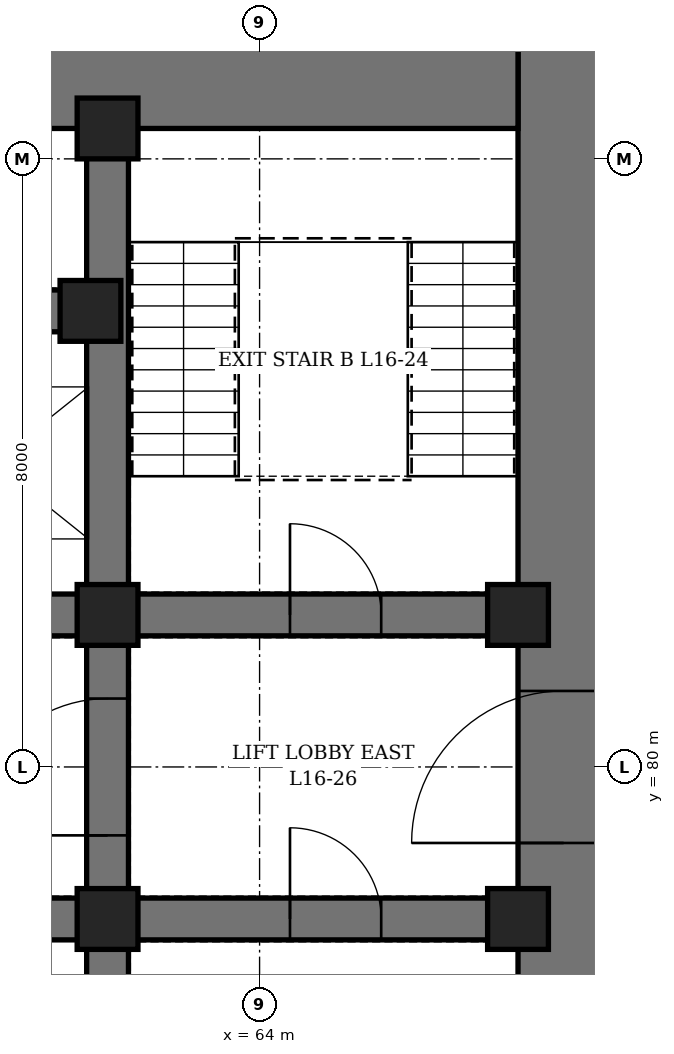
"""IFC4 building model, lengths in metres.
Left out: names, types, materials, properties, quantities, classifications, styles, units other than length and angle.
Written with IfcOpenShell. Run it as: python <this file> out.ifc"""

import sys

from ifc_helpers import new_model, si_unit, direction, frame, frame_2d, origin, origin_2d, place, context, subcontext, project, spatial, rectangle, hollow_rectangle, extrude, element, fill, save


model = new_model("IFC4")
c1 = context("Model", 3, precision=1e-05, world=origin(), true_north=direction((0.0, 1.0)))
c2 = subcontext(c1, "Body", "Model", "MODEL_VIEW")
j1 = project(units=[si_unit("LENGTHUNIT", "METRE"), si_unit("PLANEANGLEUNIT", "RADIAN")], contexts=[c1])
p1 = place(None, origin())
s1 = spatial("IfcSite", under=j1, at=p1, CompositionType="ELEMENT")
p2 = place(p1, origin())
s2 = spatial("IfcBuilding", under=s1, at=p2, CompositionType="ELEMENT")
p3 = place(p2, frame((0.0, 0.0, 76.9)))
s3 = spatial("IfcBuildingStorey", under=s2, at=p3, CompositionType="ELEMENT", Elevation=76.9)
p4 = place(p3, frame((68.0, 70.4, 0.0), z_axis=(0.0, 0.0, 1.0), x_axis=(0.0, 1.0, 0.0)))
e1 = element("IfcWall", 1, at=p4, inside=s3, PredefinedType="SHEAR", context=c2, shape_type="SweptSolid", body=[
    extrude(rectangle(XDim=19.2, YDim=1.2, at=frame_2d((9.6, 0.0))), origin(), (0.0, 0.0, 1.0), 4.2),
])
p5 = place(p4, frame((8.6, 0.0, 0.0)))
e2 = element("IfcOpeningElement", 2, at=p5, cuts=e1, PredefinedType="OPENING", context=c2, shape_type="SweptSolid", body=[
    extrude(rectangle(XDim=2.0, YDim=2.4, at=frame_2d((1.0, 1.2))), frame((0.0, 0.61, 0.0), z_axis=(0.0, -1.0, 0.0), x_axis=(1.0, 0.0, 0.0)), (0.0, 0.0, 1.0), 1.22),
])
p6 = place(p3, frame((44.6, 89.0, 0.0), z_axis=(0.0, 0.0, 1.0), x_axis=(1.0, 0.0, 0.0)))
e3 = element("IfcWall", 3, at=p6, inside=s3, PredefinedType="SHEAR", context=c2, shape_type="SweptSolid", body=[
    extrude(rectangle(XDim=22.8, YDim=1.2, at=frame_2d((11.4, 0.0))), origin(), (0.0, 0.0, 1.0), 4.2),
])
p7 = place(p6, frame((9.425, 0.0, 0.0)))
e4 = element("IfcOpeningElement", 4, at=p7, cuts=e3, PredefinedType="OPENING", context=c2, shape_type="SweptSolid", body=[
    extrude(rectangle(XDim=1.0, YDim=2.1, at=frame_2d((0.5, 1.05))), frame((0.0, 0.61, 0.0), z_axis=(0.0, -1.0, 0.0), x_axis=(1.0, 0.0, 0.0)), (0.0, 0.0, 1.0), 1.22),
])
p8 = place(p6, frame((6.65, 0.0, 0.0)))
e5 = element("IfcOpeningElement", 5, at=p8, cuts=e3, PredefinedType="OPENING", context=c2, shape_type="SweptSolid", body=[
    extrude(rectangle(XDim=0.9, YDim=2.1, at=frame_2d((0.45, 1.05))), frame((0.0, 0.61, 0.0), z_axis=(0.0, -1.0, 0.0), x_axis=(1.0, 0.0, 0.0)), (0.0, 0.0, 1.0), 1.22),
])
p9 = place(p6, frame((13.038, 0.0, 0.0)))
e6 = element("IfcOpeningElement", 6, at=p9, cuts=e3, PredefinedType="OPENING", context=c2, shape_type="SweptSolid", body=[
    extrude(rectangle(XDim=0.9, YDim=2.1, at=frame_2d((0.45, 1.05))), frame((0.0, 0.61, 0.0), z_axis=(0.0, -1.0, 0.0), x_axis=(1.0, 0.0, 0.0)), (0.0, 0.0, 1.0), 1.22),
])
p10 = place(p3, frame((62.0, 71.6, 0.0), z_axis=(0.0, 0.0, 1.0), x_axis=(0.0, 1.0, 0.0)))
e7 = element("IfcWall", 7, at=p10, inside=s3, PredefinedType="SHEAR", context=c2, shape_type="SweptSolid", body=[
    extrude(rectangle(XDim=16.8, YDim=0.55, at=frame_2d((8.4, 0.0))), origin(), (0.0, 0.0, 1.0), 4.2),
])
p11 = place(p10, frame((7.5, 0.0, 0.0)))
e8 = element("IfcOpeningElement", 8, at=p11, cuts=e7, PredefinedType="OPENING", context=c2, shape_type="SweptSolid", body=[
    extrude(rectangle(XDim=1.8, YDim=2.4, at=frame_2d((0.9, 1.2))), frame((0.0, 0.285, 0.0), z_axis=(0.0, -1.0, 0.0), x_axis=(1.0, 0.0, 0.0)), (0.0, 0.0, 1.0), 0.57),
])
p12 = place(p3, frame((62.275, 78.0, 0.0), z_axis=(0.0, 0.0, 1.0), x_axis=(1.0, 0.0, 0.0)))
e9 = element("IfcWall", 9, at=p12, inside=s3, PredefinedType="SHEAR", context=c2, shape_type="SweptSolid", body=[
    extrude(rectangle(XDim=5.125, YDim=0.55, at=frame_2d((2.562, 0.0))), origin(), (0.0, 0.0, 1.0), 4.2),
])
p13 = place(p12, frame((2.125, 0.0, 0.0)))
e10 = element("IfcOpeningElement", 10, at=p13, cuts=e9, PredefinedType="OPENING", context=c2, shape_type="SweptSolid", body=[
    extrude(rectangle(XDim=1.2, YDim=2.1, at=frame_2d((0.6, 1.05))), frame((0.0, 0.285, 0.0), z_axis=(0.0, -1.0, 0.0), x_axis=(1.0, 0.0, 0.0)), (0.0, 0.0, 1.0), 0.57),
])
p14 = place(p3, frame((62.275, 82.0, 0.0), z_axis=(0.0, 0.0, 1.0), x_axis=(1.0, 0.0, 0.0)))
e11 = element("IfcWall", 11, at=p14, inside=s3, PredefinedType="SHEAR", context=c2, shape_type="SweptSolid", body=[
    extrude(rectangle(XDim=5.125, YDim=0.55, at=frame_2d((2.562, 0.0))), origin(), (0.0, 0.0, 1.0), 4.2),
])
p15 = place(p14, frame((2.125, 0.0, 0.0)))
e12 = element("IfcOpeningElement", 12, at=p15, cuts=e11, PredefinedType="OPENING", context=c2, shape_type="SweptSolid", body=[
    extrude(rectangle(XDim=1.2, YDim=2.1, at=frame_2d((0.6, 1.05))), frame((0.0, 0.285, 0.0), z_axis=(0.0, -1.0, 0.0), x_axis=(1.0, 0.0, 0.0)), (0.0, 0.0, 1.0), 0.57),
])
p16 = place(p3, frame((50.275, 78.0, 0.0), z_axis=(0.0, 0.0, 1.0), x_axis=(1.0, 0.0, 0.0)))
e13 = element("IfcWall", 13, at=p16, inside=s3, PredefinedType="SHEAR", context=c2, shape_type="SweptSolid", body=[
    extrude(rectangle(XDim=11.45, YDim=0.55, at=frame_2d((5.725, 0.0))), origin(), (0.0, 0.0, 1.0), 4.2),
])
p17 = place(p16, frame((0.675, 0.0, 0.0)))
e14 = element("IfcOpeningElement", 14, at=p17, cuts=e13, PredefinedType="OPENING", context=c2, shape_type="SweptSolid", body=[
    extrude(rectangle(XDim=1.1, YDim=2.2, at=frame_2d((0.55, 1.1))), frame((0.0, 0.285, 0.0), z_axis=(0.0, -1.0, 0.0), x_axis=(1.0, 0.0, 0.0)), (0.0, 0.0, 1.0), 0.57),
])
p18 = place(p16, frame((3.675, 0.0, 0.0)))
e15 = element("IfcOpeningElement", 15, at=p18, cuts=e13, PredefinedType="OPENING", context=c2, shape_type="SweptSolid", body=[
    extrude(rectangle(XDim=1.1, YDim=2.2, at=frame_2d((0.55, 1.1))), frame((0.0, 0.285, 0.0), z_axis=(0.0, -1.0, 0.0), x_axis=(1.0, 0.0, 0.0)), (0.0, 0.0, 1.0), 0.57),
])
p19 = place(p16, frame((6.675, 0.0, 0.0)))
e16 = element("IfcOpeningElement", 16, at=p19, cuts=e13, PredefinedType="OPENING", context=c2, shape_type="SweptSolid", body=[
    extrude(rectangle(XDim=1.1, YDim=2.2, at=frame_2d((0.55, 1.1))), frame((0.0, 0.285, 0.0), z_axis=(0.0, -1.0, 0.0), x_axis=(1.0, 0.0, 0.0)), (0.0, 0.0, 1.0), 0.57),
])
p20 = place(p16, frame((9.675, 0.0, 0.0)))
e17 = element("IfcOpeningElement", 17, at=p20, cuts=e13, PredefinedType="OPENING", context=c2, shape_type="SweptSolid", body=[
    extrude(rectangle(XDim=1.1, YDim=2.2, at=frame_2d((0.55, 1.1))), frame((0.0, 0.285, 0.0), z_axis=(0.0, -1.0, 0.0), x_axis=(1.0, 0.0, 0.0)), (0.0, 0.0, 1.0), 0.57),
])
for number, where, z_axis, x_axis in (
    (18, (50.275, 82.0, 0.0), (0.0, 0.0, 1.0), (1.0, 0.0, 0.0)),
    (19, (50.275, 86.0, 0.0), (0.0, 0.0, 1.0), (1.0, 0.0, 0.0)),
):
    element("IfcWall", number, at=place(p3, frame(where, z_axis=z_axis, x_axis=x_axis)), inside=s3, PredefinedType="SHEAR", context=c2, shape_type="SweptSolid", body=[
        extrude(rectangle(XDim=11.45, YDim=0.55, at=frame_2d((5.725, 0.0))), origin(), (0.0, 0.0, 1.0), 4.2),
    ])
for number, where, z_axis, x_axis in (
    (20, (61.775, 86.0, 0.0), (0.0, 0.0, 1.0), (1.0, 0.0, 0.0)),
    (21, (62.0, 78.0, 0.0), (0.0, 0.0, 1.0), (1.0, 0.0, 0.0)),
    (22, (62.0, 82.0, 0.0), (0.0, 0.0, 1.0), (1.0, 0.0, 0.0)),
    (23, (62.0, 88.4, 0.0), (0.0, 0.0, 1.0), (1.0, 0.0, 0.0)),
    (24, (67.4, 78.0, 0.0), (0.0, 0.0, 1.0), (1.0, 0.0, 0.0)),
    (25, (67.4, 82.0, 0.0), (0.0, 0.0, 1.0), (1.0, 0.0, 0.0)),
):
    element("IfcColumn", number, at=place(p3, frame(where, z_axis=z_axis, x_axis=x_axis)), inside=s3, PredefinedType="COLUMN", context=c2, shape_type="SweptSolid", body=[
        extrude(hollow_rectangle(XDim=0.8, YDim=0.8, WallThickness=0.1, at=origin_2d()), origin(), (0.0, 0.0, 1.0), 4.2),
    ])
p21 = place(p15, origin())
e26 = element("IfcDoor", 26, at=p21, inside=s3, OperationType="SINGLE_SWING_LEFT", PredefinedType="DOOR", context=c2, shape_type="SweptSolid", body=[
    extrude(rectangle(XDim=1.2, YDim=2.1, at=frame_2d((0.6, 1.05))), frame((0.0, 0.275, 0.0), z_axis=(0.0, -1.0, 0.0), x_axis=(1.0, 0.0, 0.0)), (0.0, 0.0, 1.0), 0.55),
])
fill(e12, e26)
p22 = place(p5, origin())
e27 = element("IfcDoor", 27, at=p22, inside=s3, OperationType="DOUBLE_DOOR_SINGLE_SWING", PredefinedType="DOOR", context=c2, shape_type="SweptSolid", body=[
    extrude(rectangle(XDim=2.0, YDim=2.4, at=frame_2d((1.0, 1.2))), frame((0.0, 0.35, 0.0), z_axis=(0.0, -1.0, 0.0), x_axis=(1.0, 0.0, 0.0)), (0.0, 0.0, 1.0), 0.7),
])
fill(e2, e27)
p23 = place(p11, origin())
e28 = element("IfcDoor", 28, at=p23, inside=s3, OperationType="DOUBLE_DOOR_SINGLE_SWING", PredefinedType="DOOR", context=c2, shape_type="SweptSolid", body=[
    extrude(rectangle(XDim=1.8, YDim=2.4, at=frame_2d((0.9, 1.2))), frame((0.0, 0.275, 0.0), z_axis=(0.0, -1.0, 0.0), x_axis=(1.0, 0.0, 0.0)), (0.0, 0.0, 1.0), 0.55),
])
fill(e8, e28)
p24 = place(p13, origin())
e29 = element("IfcDoor", 29, at=p24, inside=s3, OperationType="SINGLE_SWING_RIGHT", PredefinedType="DOOR", context=c2, shape_type="SweptSolid", body=[
    extrude(rectangle(XDim=1.2, YDim=2.1, at=frame_2d((0.6, 1.05))), frame((0.0, 0.275, 0.0), z_axis=(0.0, -1.0, 0.0), x_axis=(1.0, 0.0, 0.0)), (0.0, 0.0, 1.0), 0.55),
])
fill(e10, e29)
save(model, sys.argv[1])
